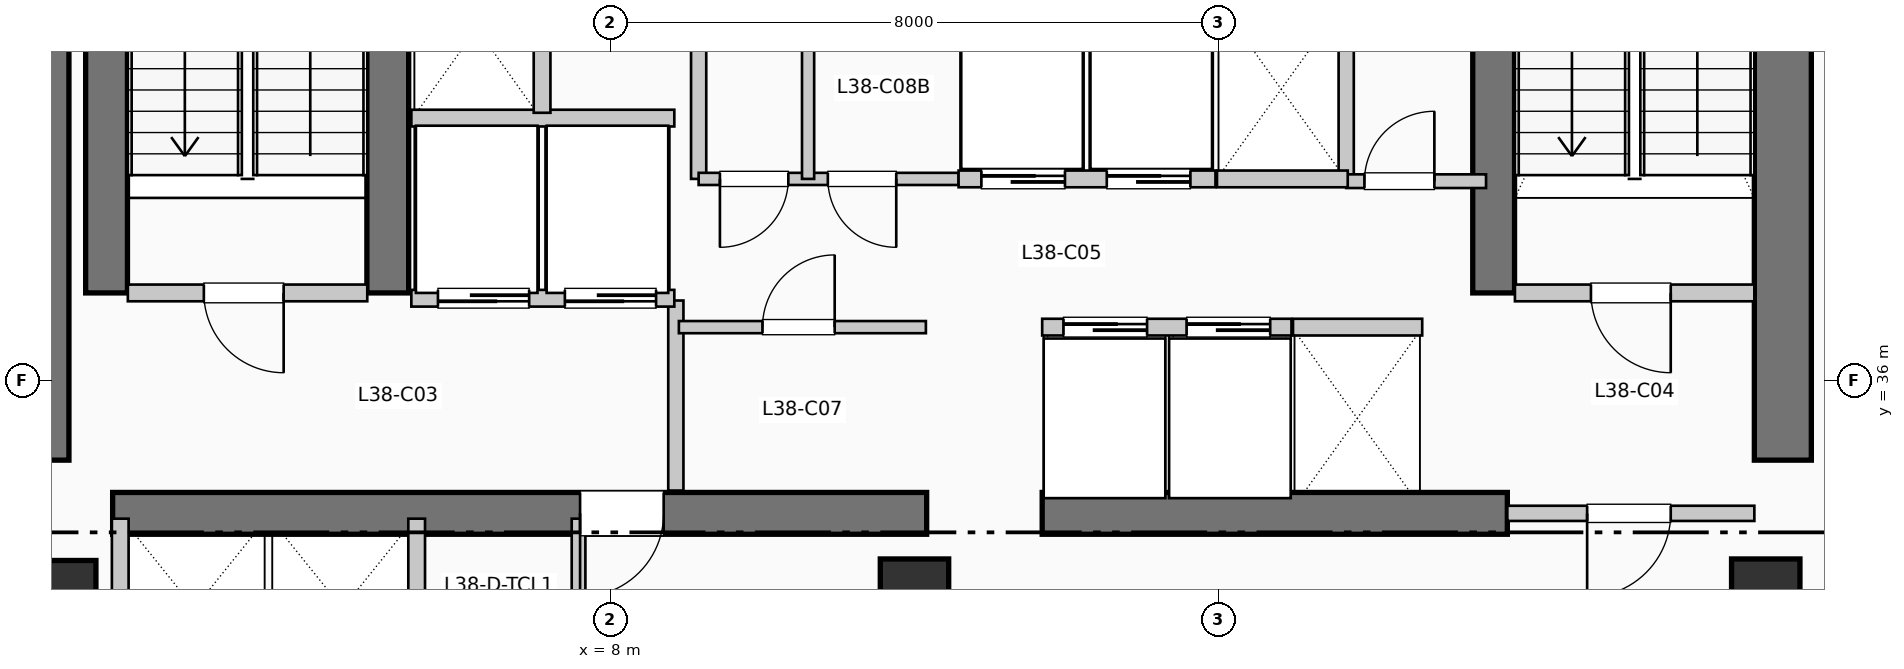
"""IFC4 building model, lengths in metres.
Left out: names, types, materials, properties, quantities, classifications, styles, units other than length and angle.
Written with IfcOpenShell. Run it as: python <this file> out.ifc"""

import sys

from ifc_helpers import new_model, si_unit, direction, frame, frame_2d, origin, origin_2d, place, context, subcontext, project, spatial, rectangle, extrude, element, fill, save


model = new_model("IFC4")
c1 = context("Model", 3, precision=1e-05, world=origin(), true_north=direction((0.0, 1.0)))
c2 = subcontext(c1, "Body", "Model", "MODEL_VIEW")
j1 = project(units=[si_unit("LENGTHUNIT", "METRE"), si_unit("PLANEANGLEUNIT", "RADIAN")], contexts=[c1])
p1 = place(None, origin())
s1 = spatial("IfcSite", under=j1, at=p1, CompositionType="ELEMENT")
p2 = place(p1, origin())
s2 = spatial("IfcBuilding", under=s1, at=p2, CompositionType="ELEMENT")
p3 = place(p2, frame((0.0, 0.0, 158.73)))
s3 = spatial("IfcBuildingStorey", under=s2, at=p3, CompositionType="ELEMENT", Elevation=158.73)
p4 = place(p3, frame((0.5, 34.95, 0.0), z_axis=(0.0, 0.0, 1.0), x_axis=(0.0, 1.0, 0.0)))
e1 = element("IfcWall", 1, at=p4, inside=s3, PredefinedType="SHEAR", context=c2, shape_type="SweptSolid", body=[
    extrude(rectangle(XDim=7.9, YDim=0.75, at=frame_2d((3.95, 0.0))), origin(), (0.0, 0.0, 1.0), 3.96),
])
p5 = place(p3, frame((23.425, 34.95, 0.0), z_axis=(0.0, 0.0, 1.0), x_axis=(0.0, 1.0, 0.0)))
e2 = element("IfcWall", 2, at=p5, inside=s3, PredefinedType="SHEAR", context=c2, shape_type="SweptSolid", body=[
    extrude(rectangle(XDim=10.64, YDim=0.75, at=frame_2d((5.32, 0.0))), origin(), (0.0, 0.0, 1.0), 3.96),
])
p6 = place(p3, frame((1.45, 34.25, 0.0), z_axis=(0.0, 0.0, 1.0), x_axis=(1.0, 0.0, 0.0)))
e3 = element("IfcWall", 3, at=p6, inside=s3, PredefinedType="SHEAR", context=c2, shape_type="SweptSolid", body=[
    extrude(rectangle(XDim=10.71, YDim=0.55, at=frame_2d((5.355, 0.0))), origin(), (0.0, 0.0, 1.0), 3.96),
])
p7 = place(p6, frame((7.25, 0.0, 0.0), z_axis=(0.0, 0.0, 1.0), x_axis=(-1.0, 0.0, 0.0)))
e4 = element("IfcOpeningElement", 4, at=p7, cuts=e3, PredefinedType="OPENING", context=c2, shape_type="SweptSolid", body=[
    extrude(rectangle(XDim=1.1, YDim=2.15, at=frame_2d((0.55, 1.075))), frame((0.0, 0.285, 0.0), z_axis=(0.0, -1.0, 0.0), x_axis=(1.0, 0.0, 0.0)), (0.0, 0.0, 1.0), 0.57),
])
p8 = place(p3, frame((13.68, 34.25, 0.0), z_axis=(0.0, 0.0, 1.0), x_axis=(1.0, 0.0, 0.0)))
e5 = element("IfcWall", 5, at=p8, inside=s3, PredefinedType="SHEAR", context=c2, shape_type="SweptSolid", body=[
    extrude(rectangle(XDim=6.12, YDim=0.55, at=frame_2d((3.06, 0.0))), origin(), (0.0, 0.0, 1.0), 3.96),
])
for number, where, z_axis, x_axis in (
    (6, (1.37, 37.15, 0.0), (0.0, 0.0, 1.0), (0.0, 1.0, 0.0)),
    (7, (5.07, 37.15, 0.0), (0.0, 0.0, 1.0), (0.0, 1.0, 0.0)),
    (8, (19.62, 37.15, 0.0), (0.0, 0.0, 1.0), (0.0, 1.0, 0.0)),
):
    element("IfcWall", number, at=place(p3, frame(where, z_axis=z_axis, x_axis=x_axis)), inside=s3, PredefinedType="SHEAR", context=c2, shape_type="SweptSolid", body=[
        extrude(rectangle(XDim=7.89, YDim=0.55, at=frame_2d((3.945, 0.0))), origin(), (0.0, 0.0, 1.0), 3.96),
    ])
p9 = place(p3, frame((0.8, 33.2, 0.0), z_axis=(0.0, 0.0, 1.0), x_axis=(1.0, 0.0, 0.0)))
e9 = element("IfcColumn", 9, at=p9, inside=s3, PredefinedType="COLUMN", context=c2, shape_type="SweptSolid", body=[
    extrude(rectangle(XDim=0.86, YDim=0.86, at=origin_2d()), origin(), (0.0, 0.0, 1.0), 3.96),
])
for number, where, z_axis, x_axis in (
    (10, (12.0, 33.2, 0.0), (0.0, 0.0, 1.0), (1.0, 0.0, 0.0)),
    (11, (23.2, 33.2, 0.0), (0.0, 0.0, 1.0), (1.0, 0.0, 0.0)),
):
    element("IfcColumn", number, at=place(p3, frame(where, z_axis=z_axis, x_axis=x_axis)), inside=s3, PredefinedType="COLUMN", context=c2, shape_type="SweptSolid", body=[
        extrude(rectangle(XDim=0.9, YDim=0.9, at=origin_2d()), origin(), (0.0, 0.0, 1.0), 3.96),
    ])
p10 = place(p3, frame((1.65, 37.15, 0.0), z_axis=(0.0, 0.0, 1.0), x_axis=(1.0, 0.0, 0.0)))
e12 = element("IfcWall", 12, at=p10, inside=s3, PredefinedType="PARTITIONING", context=c2, shape_type="SweptSolid", body=[
    extrude(rectangle(XDim=3.15, YDim=0.22, at=frame_2d((1.575, 0.0))), origin(), (0.0, 0.0, 1.0), 3.71),
])
p11 = place(p10, frame((2.05, 0.0, 0.0), z_axis=(0.0, 0.0, 1.0), x_axis=(-1.0, 0.0, 0.0)))
e13 = element("IfcOpeningElement", 13, at=p11, cuts=e12, PredefinedType="OPENING", context=c2, shape_type="SweptSolid", body=[
    extrude(rectangle(XDim=1.05, YDim=2.15, at=frame_2d((0.525, 1.075))), frame((0.0, 0.12, 0.0), z_axis=(0.0, -1.0, 0.0), x_axis=(1.0, 0.0, 0.0)), (0.0, 0.0, 1.0), 0.24),
])
p12 = place(p3, frame((8.86, 34.55, 0.0), z_axis=(0.0, 0.0, 1.0), x_axis=(0.0, 1.0, 0.0)))
e14 = element("IfcWall", 14, at=p12, inside=s3, PredefinedType="PARTITIONING", context=c2, shape_type="SweptSolid", body=[
    extrude(rectangle(XDim=2.5, YDim=0.2, at=frame_2d((1.25, 0.0))), origin(), (0.0, 0.0, 1.0), 3.71),
])
p13 = place(p3, frame((19.9, 37.15, 0.0), z_axis=(0.0, 0.0, 1.0), x_axis=(1.0, 0.0, 0.0)))
e15 = element("IfcWall", 15, at=p13, inside=s3, PredefinedType="PARTITIONING", context=c2, shape_type="SweptSolid", body=[
    extrude(rectangle(XDim=3.15, YDim=0.22, at=frame_2d((1.575, 0.0))), origin(), (0.0, 0.0, 1.0), 3.71),
])
p14 = place(p13, frame((2.05, 0.0, 0.0), z_axis=(0.0, 0.0, 1.0), x_axis=(-1.0, 0.0, 0.0)))
e16 = element("IfcOpeningElement", 16, at=p14, cuts=e15, PredefinedType="OPENING", context=c2, shape_type="SweptSolid", body=[
    extrude(rectangle(XDim=1.05, YDim=2.15, at=frame_2d((0.525, 1.075))), frame((0.0, 0.12, 0.0), z_axis=(0.0, -1.0, 0.0), x_axis=(1.0, 0.0, 0.0)), (0.0, 0.0, 1.0), 0.24),
])
p15 = place(p3, frame((19.8, 34.25, 0.0), z_axis=(0.0, 0.0, 1.0), x_axis=(1.0, 0.0, 0.0)))
e17 = element("IfcWall", 17, at=p15, inside=s3, PredefinedType="PARTITIONING", context=c2, shape_type="SweptSolid", body=[
    extrude(rectangle(XDim=3.25, YDim=0.2, at=frame_2d((1.625, 0.0))), origin(), (0.0, 0.0, 1.0), 3.71),
])
p16 = place(p15, frame((2.15, 0.0, 0.0), z_axis=(0.0, 0.0, 1.0), x_axis=(-1.0, 0.0, 0.0)))
e18 = element("IfcOpeningElement", 18, at=p16, cuts=e17, PredefinedType="OPENING", context=c2, shape_type="SweptSolid", body=[
    extrude(rectangle(XDim=1.1, YDim=2.15, at=frame_2d((0.55, 1.075))), frame((0.0, 0.11, 0.0), z_axis=(0.0, -1.0, 0.0), x_axis=(1.0, 0.0, 0.0)), (0.0, 0.0, 1.0), 0.22),
])
p17 = place(p3, frame((5.38, 37.08, 0.0), z_axis=(0.0, 0.0, 1.0), x_axis=(1.0, 0.0, 0.0)))
e19 = element("IfcWall", 19, at=p17, inside=s3, PredefinedType="PARTITIONING", context=c2, shape_type="SweptSolid", body=[
    extrude(rectangle(XDim=3.46, YDim=0.22, at=frame_2d((1.73, 0.0))), origin(), (0.0, 0.0, 1.0), 3.71),
])
p18 = place(p17, frame((1.55, 0.0, 0.0), z_axis=(0.0, 0.0, 1.0), x_axis=(-1.0, 0.0, 0.0)))
e20 = element("IfcOpeningElement", 20, at=p18, cuts=e19, PredefinedType="OPENING", context=c2, shape_type="SweptSolid", body=[
    extrude(rectangle(XDim=1.2, YDim=2.2, at=frame_2d((0.6, 1.1))), frame((0.0, 0.12, 0.0), z_axis=(0.0, -1.0, 0.0), x_axis=(1.0, 0.0, 0.0)), (0.0, 0.0, 1.0), 0.24),
])
p19 = place(p17, frame((3.22, 0.0, 0.0), z_axis=(0.0, 0.0, 1.0), x_axis=(-1.0, 0.0, 0.0)))
e21 = element("IfcOpeningElement", 21, at=p19, cuts=e19, PredefinedType="OPENING", context=c2, shape_type="SweptSolid", body=[
    extrude(rectangle(XDim=1.2, YDim=2.2, at=frame_2d((0.6, 1.1))), frame((0.0, 0.12, 0.0), z_axis=(0.0, -1.0, 0.0), x_axis=(1.0, 0.0, 0.0)), (0.0, 0.0, 1.0), 0.24),
])
p20 = place(p3, frame((5.38, 39.45, 0.0), z_axis=(0.0, 0.0, 1.0), x_axis=(1.0, 0.0, 0.0)))
e22 = element("IfcWall", 22, at=p20, inside=s3, PredefinedType="PARTITIONING", context=c2, shape_type="SweptSolid", body=[
    extrude(rectangle(XDim=3.46, YDim=0.22, at=frame_2d((1.73, 0.0))), origin(), (0.0, 0.0, 1.0), 3.71),
])
p21 = place(p3, frame((7.1, 39.52, 0.0), z_axis=(0.0, 0.0, 1.0), x_axis=(0.0, 1.0, 0.0)))
e23 = element("IfcWall", 23, at=p21, inside=s3, PredefinedType="PARTITIONING", context=c2, shape_type="SweptSolid", body=[
    extrude(rectangle(XDim=2.93, YDim=0.22, at=frame_2d((1.465, 0.0))), origin(), (0.0, 0.0, 1.0), 3.71),
])
for number, where, z_axis, x_axis in (
    (24, (1.55, 31.8, 0.0), (0.0, 0.0, 1.0), (0.0, 1.0, 0.0)),
    (25, (5.45, 31.8, 0.0), (0.0, 0.0, 1.0), (0.0, 1.0, 0.0)),
):
    element("IfcWall", number, at=place(p3, frame(where, z_axis=z_axis, x_axis=x_axis)), inside=s3, PredefinedType="PARTITIONING", context=c2, shape_type="SweptSolid", body=[
        extrude(rectangle(XDim=2.38, YDim=0.22, at=frame_2d((1.19, 0.0))), origin(), (0.0, 0.0, 1.0), 3.71),
    ])
for number, where, z_axis, x_axis in (
    (26, (9.16, 38.65, 0.0), (0.0, 0.0, 1.0), (0.0, 1.0, 0.0)),
    (27, (17.68, 38.65, 0.0), (0.0, 0.0, 1.0), (0.0, 1.0, 0.0)),
):
    element("IfcWall", number, at=place(p3, frame(where, z_axis=z_axis, x_axis=x_axis)), inside=s3, PredefinedType="PARTITIONING", context=c2, shape_type="SweptSolid", body=[
        extrude(rectangle(XDim=2.35, YDim=0.2, at=frame_2d((1.175, 0.0))), origin(), (0.0, 0.0, 1.0), 3.71),
    ])
p22 = place(p3, frame((17.68, 38.62, 0.0), z_axis=(0.0, 0.0, 1.0), x_axis=(1.0, 0.0, 0.0)))
e28 = element("IfcWall", 28, at=p22, inside=s3, PredefinedType="PARTITIONING", context=c2, shape_type="SweptSolid", body=[
    extrude(rectangle(XDim=1.84, YDim=0.18, at=frame_2d((0.92, 0.0))), origin(), (0.0, 0.0, 1.0), 3.71),
])
p23 = place(p22, frame((0.24, 0.0, 0.0)))
e29 = element("IfcOpeningElement", 29, at=p23, cuts=e28, PredefinedType="OPENING", context=c2, shape_type="SweptSolid", body=[
    extrude(rectangle(XDim=0.92, YDim=2.1, at=frame_2d((0.46, 1.05))), frame((0.0, 0.1, 0.0), z_axis=(0.0, -1.0, 0.0), x_axis=(1.0, 0.0, 0.0)), (0.0, 0.0, 1.0), 0.2),
])
p24 = place(p3, frame((7.58, 31.82, 0.0), z_axis=(0.0, 0.0, 1.0), x_axis=(0.0, 1.0, 0.0)))
e30 = element("IfcWall", 30, at=p24, inside=s3, PredefinedType="PLUMBINGWALL", context=c2, shape_type="SweptSolid", body=[
    extrude(rectangle(XDim=2.36, YDim=0.18, at=frame_2d((1.18, 0.0))), origin(), (0.0, 0.0, 1.0), 3.71),
])
p25 = place(p3, frame((8.9, 36.7, 0.0), z_axis=(0.0, 0.0, 1.0), x_axis=(1.0, 0.0, 0.0)))
e31 = element("IfcWall", 31, at=p25, inside=s3, PredefinedType="PARTITIONING", context=c2, shape_type="SweptSolid", body=[
    extrude(rectangle(XDim=3.25, YDim=0.16, at=frame_2d((1.625, 0.0))), origin(), (0.0, 0.0, 1.0), 3.71),
])
p26 = place(p25, frame((1.1, 0.0, 0.0)))
e32 = element("IfcOpeningElement", 32, at=p26, cuts=e31, PredefinedType="OPENING", context=c2, shape_type="SweptSolid", body=[
    extrude(rectangle(XDim=0.95, YDim=2.15, at=frame_2d((0.475, 1.075))), frame((0.0, 0.09, 0.0), z_axis=(0.0, -1.0, 0.0), x_axis=(1.0, 0.0, 0.0)), (0.0, 0.0, 1.0), 0.18),
])
p27 = place(p3, frame((9.16, 38.65, 0.0), z_axis=(0.0, 0.0, 1.0), x_axis=(1.0, 0.0, 0.0)))
e33 = element("IfcWall", 33, at=p27, inside=s3, PredefinedType="PARTITIONING", context=c2, shape_type="SweptSolid", body=[
    extrude(rectangle(XDim=3.42, YDim=0.16, at=frame_2d((1.71, 0.0))), origin(), (0.0, 0.0, 1.0), 3.71),
])
p28 = place(p27, frame((1.18, 0.0, 0.0), z_axis=(0.0, 0.0, 1.0), x_axis=(-1.0, 0.0, 0.0)))
e34 = element("IfcOpeningElement", 34, at=p28, cuts=e33, PredefinedType="OPENING", context=c2, shape_type="SweptSolid", body=[
    extrude(rectangle(XDim=0.9, YDim=2.15, at=frame_2d((0.45, 1.075))), frame((0.0, 0.09, 0.0), z_axis=(0.0, -1.0, 0.0), x_axis=(1.0, 0.0, 0.0)), (0.0, 0.0, 1.0), 0.18),
])
p29 = place(p27, frame((2.6, 0.0, 0.0), z_axis=(0.0, 0.0, 1.0), x_axis=(-1.0, 0.0, 0.0)))
e35 = element("IfcOpeningElement", 35, at=p29, cuts=e33, PredefinedType="OPENING", context=c2, shape_type="SweptSolid", body=[
    extrude(rectangle(XDim=0.9, YDim=2.15, at=frame_2d((0.45, 1.075))), frame((0.0, 0.09, 0.0), z_axis=(0.0, -1.0, 0.0), x_axis=(1.0, 0.0, 0.0)), (0.0, 0.0, 1.0), 0.18),
])
p30 = place(p3, frame((10.6, 38.65, 0.0), z_axis=(0.0, 0.0, 1.0), x_axis=(0.0, 1.0, 0.0)))
e36 = element("IfcWall", 36, at=p30, inside=s3, PredefinedType="PARTITIONING", context=c2, shape_type="SweptSolid", body=[
    extrude(rectangle(XDim=2.35, YDim=0.16, at=frame_2d((1.175, 0.0))), origin(), (0.0, 0.0, 1.0), 3.71),
])
p31 = place(p3, frame((13.68, 36.7, 0.0), z_axis=(0.0, 0.0, 1.0), x_axis=(1.0, 0.0, 0.0)))
e37 = element("IfcWall", 37, at=p31, inside=s3, PredefinedType="PARTITIONING", context=c2, shape_type="SweptSolid", body=[
    extrude(rectangle(XDim=3.28, YDim=0.22, at=frame_2d((1.64, 0.0))), origin(), (0.0, 0.0, 1.0), 3.71),
])
p32 = place(p31, frame((0.28, 0.0, 0.0)))
e38 = element("IfcOpeningElement", 38, at=p32, cuts=e37, PredefinedType="OPENING", context=c2, shape_type="SweptSolid", body=[
    extrude(rectangle(XDim=1.1, YDim=2.2, at=frame_2d((0.55, 1.1))), frame((0.0, 0.12, 0.0), z_axis=(0.0, -1.0, 0.0), x_axis=(1.0, 0.0, 0.0)), (0.0, 0.0, 1.0), 0.24),
])
p33 = place(p31, frame((1.9, 0.0, 0.0)))
e39 = element("IfcOpeningElement", 39, at=p33, cuts=e37, PredefinedType="OPENING", context=c2, shape_type="SweptSolid", body=[
    extrude(rectangle(XDim=1.1, YDim=2.2, at=frame_2d((0.55, 1.1))), frame((0.0, 0.12, 0.0), z_axis=(0.0, -1.0, 0.0), x_axis=(1.0, 0.0, 0.0)), (0.0, 0.0, 1.0), 0.24),
])
p34 = place(p3, frame((12.58, 38.65, 0.0), z_axis=(0.0, 0.0, 1.0), x_axis=(1.0, 0.0, 0.0)))
e40 = element("IfcWall", 40, at=p34, inside=s3, PredefinedType="PARTITIONING", context=c2, shape_type="SweptSolid", body=[
    extrude(rectangle(XDim=3.38, YDim=0.22, at=frame_2d((1.69, 0.0))), origin(), (0.0, 0.0, 1.0), 3.71),
])
p35 = place(p34, frame((0.3, 0.0, 0.0)))
e41 = element("IfcOpeningElement", 41, at=p35, cuts=e40, PredefinedType="OPENING", context=c2, shape_type="SweptSolid", body=[
    extrude(rectangle(XDim=1.1, YDim=2.2, at=frame_2d((0.55, 1.1))), frame((0.0, 0.12, 0.0), z_axis=(0.0, -1.0, 0.0), x_axis=(1.0, 0.0, 0.0)), (0.0, 0.0, 1.0), 0.24),
])
p36 = place(p34, frame((1.95, 0.0, 0.0)))
e42 = element("IfcOpeningElement", 42, at=p36, cuts=e40, PredefinedType="OPENING", context=c2, shape_type="SweptSolid", body=[
    extrude(rectangle(XDim=1.1, YDim=2.2, at=frame_2d((0.55, 1.1))), frame((0.0, 0.12, 0.0), z_axis=(0.0, -1.0, 0.0), x_axis=(1.0, 0.0, 0.0)), (0.0, 0.0, 1.0), 0.24),
])
p37 = place(p3, frame((16.98, 36.7, 0.0), z_axis=(0.0, 0.0, 1.0), x_axis=(1.0, 0.0, 0.0)))
e43 = element("IfcWall", 43, at=p37, inside=s3, PredefinedType="PARTITIONING", context=c2, shape_type="SweptSolid", body=[
    extrude(rectangle(XDim=1.7, YDim=0.22, at=frame_2d((0.85, 0.0))), origin(), (0.0, 0.0, 1.0), 3.71),
])
p38 = place(p3, frame((15.98, 38.65, 0.0), z_axis=(0.0, 0.0, 1.0), x_axis=(1.0, 0.0, 0.0)))
e44 = element("IfcWall", 44, at=p38, inside=s3, PredefinedType="PARTITIONING", context=c2, shape_type="SweptSolid", body=[
    extrude(rectangle(XDim=1.72, YDim=0.22, at=frame_2d((0.86, 0.0))), origin(), (0.0, 0.0, 1.0), 3.71),
])
p39 = place(p11, origin())
e45 = element("IfcDoor", 45, at=p39, inside=s3, OperationType="SINGLE_SWING_RIGHT", PredefinedType="DOOR", context=c2, shape_type="SweptSolid", body=[
    extrude(rectangle(XDim=1.05, YDim=2.15, at=frame_2d((0.525, 1.075))), frame((0.0, 0.025, 0.0), z_axis=(0.0, -1.0, 0.0), x_axis=(1.0, 0.0, 0.0)), (0.0, 0.0, 1.0), 0.05),
])
fill(e13, e45)
p40 = place(p7, origin())
e46 = element("IfcDoor", 46, at=p40, inside=s3, OperationType="SINGLE_SWING_LEFT", PredefinedType="DOOR", context=c2, shape_type="SweptSolid", body=[
    extrude(rectangle(XDim=1.1, YDim=2.15, at=frame_2d((0.55, 1.075))), frame((0.0, 0.025, 0.0), z_axis=(0.0, -1.0, 0.0), x_axis=(1.0, 0.0, 0.0)), (0.0, 0.0, 1.0), 0.05),
])
fill(e4, e46)
p41 = place(p14, origin())
e47 = element("IfcDoor", 47, at=p41, inside=s3, OperationType="SINGLE_SWING_RIGHT", PredefinedType="DOOR", context=c2, shape_type="SweptSolid", body=[
    extrude(rectangle(XDim=1.05, YDim=2.15, at=frame_2d((0.525, 1.075))), frame((0.0, 0.025, 0.0), z_axis=(0.0, -1.0, 0.0), x_axis=(1.0, 0.0, 0.0)), (0.0, 0.0, 1.0), 0.05),
])
fill(e16, e47)
p42 = place(p16, origin())
e48 = element("IfcDoor", 48, at=p42, inside=s3, OperationType="SINGLE_SWING_LEFT", PredefinedType="DOOR", context=c2, shape_type="SweptSolid", body=[
    extrude(rectangle(XDim=1.1, YDim=2.15, at=frame_2d((0.55, 1.075))), frame((0.0, 0.025, 0.0), z_axis=(0.0, -1.0, 0.0), x_axis=(1.0, 0.0, 0.0)), (0.0, 0.0, 1.0), 0.05),
])
fill(e18, e48)
p43 = place(p18, origin())
e49 = element("IfcDoor", 49, at=p43, inside=s3, OperationType="SLIDING_TO_RIGHT", PredefinedType="DOOR", context=c2, shape_type="SweptSolid", body=[
    extrude(rectangle(XDim=1.2, YDim=2.2, at=frame_2d((0.6, 1.1))), frame((0.0, 0.025, 0.0), z_axis=(0.0, -1.0, 0.0), x_axis=(1.0, 0.0, 0.0)), (0.0, 0.0, 1.0), 0.05),
])
fill(e20, e49)
p44 = place(p19, origin())
e50 = element("IfcDoor", 50, at=p44, inside=s3, OperationType="SLIDING_TO_RIGHT", PredefinedType="DOOR", context=c2, shape_type="SweptSolid", body=[
    extrude(rectangle(XDim=1.2, YDim=2.2, at=frame_2d((0.6, 1.1))), frame((0.0, 0.025, 0.0), z_axis=(0.0, -1.0, 0.0), x_axis=(1.0, 0.0, 0.0)), (0.0, 0.0, 1.0), 0.05),
])
fill(e21, e50)
p45 = place(p23, origin())
e51 = element("IfcDoor", 51, at=p45, inside=s3, OperationType="SINGLE_SWING_RIGHT", PredefinedType="DOOR", context=c2, shape_type="SweptSolid", body=[
    extrude(rectangle(XDim=0.92, YDim=2.1, at=frame_2d((0.46, 1.05))), frame((0.0, 0.025, 0.0), z_axis=(0.0, -1.0, 0.0), x_axis=(1.0, 0.0, 0.0)), (0.0, 0.0, 1.0), 0.05),
])
fill(e29, e51)
p46 = place(p26, origin())
e52 = element("IfcDoor", 52, at=p46, inside=s3, OperationType="SINGLE_SWING_RIGHT", PredefinedType="DOOR", context=c2, shape_type="SweptSolid", body=[
    extrude(rectangle(XDim=0.95, YDim=2.15, at=frame_2d((0.475, 1.075))), frame((0.0, 0.025, 0.0), z_axis=(0.0, -1.0, 0.0), x_axis=(1.0, 0.0, 0.0)), (0.0, 0.0, 1.0), 0.05),
])
fill(e32, e52)
p47 = place(p28, origin())
e53 = element("IfcDoor", 53, at=p47, inside=s3, OperationType="SINGLE_SWING_LEFT", PredefinedType="DOOR", context=c2, shape_type="SweptSolid", body=[
    extrude(rectangle(XDim=0.9, YDim=2.15, at=frame_2d((0.45, 1.075))), frame((0.0, 0.025, 0.0), z_axis=(0.0, -1.0, 0.0), x_axis=(1.0, 0.0, 0.0)), (0.0, 0.0, 1.0), 0.05),
])
fill(e34, e53)
p48 = place(p29, origin())
e54 = element("IfcDoor", 54, at=p48, inside=s3, OperationType="SINGLE_SWING_RIGHT", PredefinedType="DOOR", context=c2, shape_type="SweptSolid", body=[
    extrude(rectangle(XDim=0.9, YDim=2.15, at=frame_2d((0.45, 1.075))), frame((0.0, 0.025, 0.0), z_axis=(0.0, -1.0, 0.0), x_axis=(1.0, 0.0, 0.0)), (0.0, 0.0, 1.0), 0.05),
])
fill(e35, e54)
p49 = place(p32, origin())
e55 = element("IfcDoor", 55, at=p49, inside=s3, OperationType="SLIDING_TO_RIGHT", PredefinedType="DOOR", context=c2, shape_type="SweptSolid", body=[
    extrude(rectangle(XDim=1.1, YDim=2.2, at=frame_2d((0.55, 1.1))), frame((0.0, 0.025, 0.0), z_axis=(0.0, -1.0, 0.0), x_axis=(1.0, 0.0, 0.0)), (0.0, 0.0, 1.0), 0.05),
])
fill(e38, e55)
p50 = place(p33, origin())
e56 = element("IfcDoor", 56, at=p50, inside=s3, OperationType="SLIDING_TO_RIGHT", PredefinedType="DOOR", context=c2, shape_type="SweptSolid", body=[
    extrude(rectangle(XDim=1.1, YDim=2.2, at=frame_2d((0.55, 1.1))), frame((0.0, 0.025, 0.0), z_axis=(0.0, -1.0, 0.0), x_axis=(1.0, 0.0, 0.0)), (0.0, 0.0, 1.0), 0.05),
])
fill(e39, e56)
p51 = place(p35, origin())
e57 = element("IfcDoor", 57, at=p51, inside=s3, OperationType="SLIDING_TO_RIGHT", PredefinedType="DOOR", context=c2, shape_type="SweptSolid", body=[
    extrude(rectangle(XDim=1.1, YDim=2.2, at=frame_2d((0.55, 1.1))), frame((0.0, 0.025, 0.0), z_axis=(0.0, -1.0, 0.0), x_axis=(1.0, 0.0, 0.0)), (0.0, 0.0, 1.0), 0.05),
])
fill(e41, e57)
p52 = place(p36, origin())
e58 = element("IfcDoor", 58, at=p52, inside=s3, OperationType="SLIDING_TO_RIGHT", PredefinedType="DOOR", context=c2, shape_type="SweptSolid", body=[
    extrude(rectangle(XDim=1.1, YDim=2.2, at=frame_2d((0.55, 1.1))), frame((0.0, 0.025, 0.0), z_axis=(0.0, -1.0, 0.0), x_axis=(1.0, 0.0, 0.0)), (0.0, 0.0, 1.0), 0.05),
])
fill(e42, e58)
save(model, sys.argv[1])
